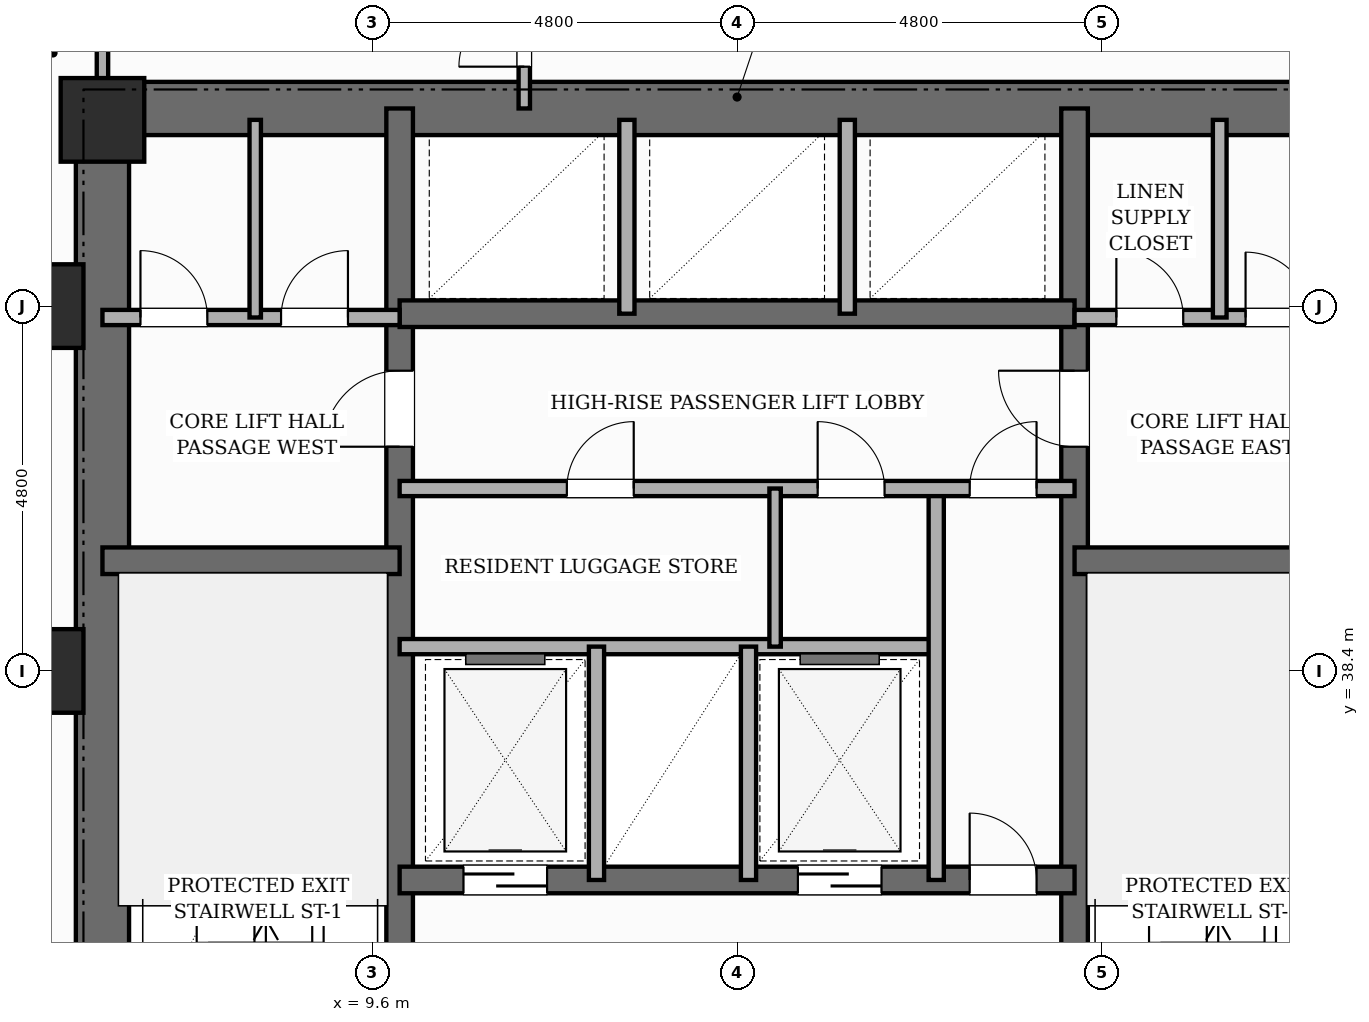
"""IFC4 building model, lengths in metres.
Left out: names, types, materials, properties, quantities, classifications, styles, units other than length and angle.
Written with IfcOpenShell. Run it as: python <this file> out.ifc"""

import sys

from ifc_helpers import new_model, si_unit, direction, frame, frame_2d, origin, origin_2d, place, context, subcontext, project, spatial, rectangle, extrude, element, fill, save


model = new_model("IFC4")
c1 = context("Model", 3, precision=1e-05, world=origin(), true_north=direction((0.0, 1.0)))
c2 = subcontext(c1, "Body", "Model", "MODEL_VIEW")
j1 = project(units=[si_unit("LENGTHUNIT", "METRE"), si_unit("PLANEANGLEUNIT", "RADIAN")], contexts=[c1])
p1 = place(None, origin())
s1 = spatial("IfcSite", under=j1, at=p1, CompositionType="ELEMENT")
p2 = place(p1, origin())
s2 = spatial("IfcBuilding", under=s1, at=p2, CompositionType="ELEMENT")
p3 = place(p2, frame((0.0, 0.0, 28.6)))
s3 = spatial("IfcBuildingStorey", under=s2, at=p3, CompositionType="ELEMENT", Elevation=28.6)
p4 = place(p3, frame((6.05, 30.55, 0.0), z_axis=(0.0, 0.0, 1.0), x_axis=(0.0, 1.0, 0.0)))
e1 = element("IfcWall", 1, at=p4, inside=s3, PredefinedType="SHEAR", context=c2, shape_type="SweptSolid", body=[
    extrude(rectangle(XDim=15.6, YDim=0.7, at=frame_2d((7.8, 0.0))), origin(), (0.0, 0.0, 1.0), 3.6),
])
p5 = place(p3, frame((6.05, 45.8, 0.0), z_axis=(0.0, 0.0, 1.0), x_axis=(1.0, 0.0, 0.0)))
e2 = element("IfcWall", 2, at=p5, inside=s3, PredefinedType="SHEAR", context=c2, shape_type="SweptSolid", body=[
    extrude(rectangle(XDim=16.7, YDim=0.7, at=frame_2d((8.35, 0.0))), origin(), (0.0, 0.0, 1.0), 3.6),
])
p6 = place(p3, frame((9.96, 30.9, 0.0), z_axis=(0.0, 0.0, 1.0), x_axis=(0.0, 1.0, 0.0)))
e3 = element("IfcWall", 3, at=p6, inside=s3, PredefinedType="SHEAR", context=c2, shape_type="SweptSolid", body=[
    extrude(rectangle(XDim=14.9, YDim=0.35, at=frame_2d((7.45, 0.0))), origin(), (0.0, 0.0, 1.0), 3.6),
])
p7 = place(p6, frame((0.65, 0.0, 0.0)))
e4 = element("IfcOpeningElement", 4, at=p7, cuts=e3, PredefinedType="OPENING", context=c2, shape_type="SweptSolid", body=[
    extrude(rectangle(XDim=0.95, YDim=2.1, at=frame_2d((0.475, 1.05))), frame((0.0, 0.185, 0.0), z_axis=(0.0, -1.0, 0.0), x_axis=(1.0, 0.0, 0.0)), (0.0, 0.0, 1.0), 0.37),
])
p8 = place(p6, frame((10.45, 0.0, 0.0)))
e5 = element("IfcOpeningElement", 5, at=p8, cuts=e3, PredefinedType="OPENING", context=c2, shape_type="SweptSolid", body=[
    extrude(rectangle(XDim=1.0, YDim=2.15, at=frame_2d((0.5, 1.075))), frame((0.0, 0.185, 0.0), z_axis=(0.0, -1.0, 0.0), x_axis=(1.0, 0.0, 0.0)), (0.0, 0.0, 1.0), 0.37),
])
p9 = place(p3, frame((18.84, 30.9, 0.0), z_axis=(0.0, 0.0, 1.0), x_axis=(0.0, 1.0, 0.0)))
e6 = element("IfcWall", 6, at=p9, inside=s3, PredefinedType="SHEAR", context=c2, shape_type="SweptSolid", body=[
    extrude(rectangle(XDim=14.9, YDim=0.35, at=frame_2d((7.45, 0.0))), origin(), (0.0, 0.0, 1.0), 3.6),
])
p10 = place(p9, frame((0.65, 0.0, 0.0)))
e7 = element("IfcOpeningElement", 7, at=p10, cuts=e6, PredefinedType="OPENING", context=c2, shape_type="SweptSolid", body=[
    extrude(rectangle(XDim=0.95, YDim=2.1, at=frame_2d((0.475, 1.05))), frame((0.0, 0.185, 0.0), z_axis=(0.0, -1.0, 0.0), x_axis=(1.0, 0.0, 0.0)), (0.0, 0.0, 1.0), 0.37),
])
p11 = place(p9, frame((10.45, 0.0, 0.0)))
e8 = element("IfcOpeningElement", 8, at=p11, cuts=e6, PredefinedType="OPENING", context=c2, shape_type="SweptSolid", body=[
    extrude(rectangle(XDim=1.0, YDim=2.15, at=frame_2d((0.5, 1.075))), frame((0.0, 0.185, 0.0), z_axis=(0.0, -1.0, 0.0), x_axis=(1.0, 0.0, 0.0)), (0.0, 0.0, 1.0), 0.37),
])
for number, where, z_axis, x_axis in (
    (9, (6.05, 39.85, 0.0), (0.0, 0.0, 1.0), (1.0, 0.0, 0.0)),
    (10, (18.84, 39.85, 0.0), (0.0, 0.0, 1.0), (1.0, 0.0, 0.0)),
):
    element("IfcWall", number, at=place(p3, frame(where, z_axis=z_axis, x_axis=x_axis)), inside=s3, PredefinedType="SHEAR", context=c2, shape_type="SweptSolid", body=[
        extrude(rectangle(XDim=3.91, YDim=0.35, at=frame_2d((1.955, 0.0))), origin(), (0.0, 0.0, 1.0), 3.6),
    ])
p12 = place(p3, frame((9.96, 35.65, 0.0), z_axis=(0.0, 0.0, 1.0), x_axis=(1.0, 0.0, 0.0)))
e11 = element("IfcWall", 11, at=p12, inside=s3, PredefinedType="SHEAR", context=c2, shape_type="SweptSolid", body=[
    extrude(rectangle(XDim=8.88, YDim=0.35, at=frame_2d((4.44, 0.0))), origin(), (0.0, 0.0, 1.0), 3.6),
])
p13 = place(p12, frame((0.84, 0.0, 0.0)))
e12 = element("IfcOpeningElement", 12, at=p13, cuts=e11, PredefinedType="OPENING", context=c2, shape_type="SweptSolid", body=[
    extrude(rectangle(XDim=1.1, YDim=2.15, at=frame_2d((0.55, 1.075))), frame((0.0, 0.185, 0.0), z_axis=(0.0, -1.0, 0.0), x_axis=(1.0, 0.0, 0.0)), (0.0, 0.0, 1.0), 0.37),
])
p14 = place(p12, frame((5.24, 0.0, 0.0)))
e13 = element("IfcOpeningElement", 13, at=p14, cuts=e11, PredefinedType="OPENING", context=c2, shape_type="SweptSolid", body=[
    extrude(rectangle(XDim=1.1, YDim=2.15, at=frame_2d((0.55, 1.075))), frame((0.0, 0.185, 0.0), z_axis=(0.0, -1.0, 0.0), x_axis=(1.0, 0.0, 0.0)), (0.0, 0.0, 1.0), 0.37),
])
p15 = place(p12, frame((7.5, 0.0, 0.0)))
e14 = element("IfcOpeningElement", 14, at=p15, cuts=e11, PredefinedType="OPENING", context=c2, shape_type="SweptSolid", body=[
    extrude(rectangle(XDim=0.88, YDim=2.1, at=frame_2d((0.44, 1.05))), frame((0.0, 0.185, 0.0), z_axis=(0.0, -1.0, 0.0), x_axis=(1.0, 0.0, 0.0)), (0.0, 0.0, 1.0), 0.37),
])
p16 = place(p3, frame((9.96, 43.1, 0.0), z_axis=(0.0, 0.0, 1.0), x_axis=(1.0, 0.0, 0.0)))
e15 = element("IfcWall", 15, at=p16, inside=s3, PredefinedType="SHEAR", context=c2, shape_type="SweptSolid", body=[
    extrude(rectangle(XDim=8.88, YDim=0.35, at=frame_2d((4.44, 0.0))), origin(), (0.0, 0.0, 1.0), 3.6),
])
for number, where, z_axis, x_axis in (
    (16, (5.25, 38.4, 0.0), (0.0, 0.0, 1.0), (1.0, 0.0, 0.0)),
    (17, (5.25, 43.2, 0.0), (0.0, 0.0, 1.0), (1.0, 0.0, 0.0)),
    (18, (6.05, 45.65, 0.0), (0.0, 0.0, 1.0), (1.0, 0.0, 0.0)),
):
    element("IfcColumn", number, at=place(p3, frame(where, z_axis=z_axis, x_axis=x_axis)), inside=s3, PredefinedType="COLUMN", context=c2, shape_type="SweptSolid", body=[
        extrude(rectangle(XDim=1.1, YDim=1.1, at=origin_2d()), origin(), (0.0, 0.0, 1.0), 3.6),
    ])
p17 = place(p3, frame((5.03, 46.16, 0.0), z_axis=(0.0, 0.0, 1.0), x_axis=(0.382650053678, 0.92389335771, 0.0)))
e19 = element("IfcWall", 19, at=p17, inside=s3, PredefinedType="STANDARD", context=c2, shape_type="SweptSolid", body=[
    extrude(rectangle(XDim=0.626, YDim=0.32, at=frame_2d((0.313, 0.0))), origin(), (0.0, 0.0, 1.0), 3.35),
])
p18 = place(p3, frame((9.96, 38.72, 0.0), z_axis=(0.0, 0.0, 1.0), x_axis=(1.0, 0.0, 0.0)))
e20 = element("IfcWall", 20, at=p18, inside=s3, PredefinedType="POLYGONAL", context=c2, shape_type="SweptSolid", body=[
    extrude(rectangle(XDim=7.06, YDim=0.2, at=frame_2d((3.53, 0.0))), origin(), (0.0, 0.0, 1.0), 3.35),
])
for number, where, z_axis, x_axis in (
    (21, (12.55, 35.65, 0.0), (0.0, 0.0, 1.0), (0.0, 1.0, 0.0)),
    (22, (14.55, 35.65, 0.0), (0.0, 0.0, 1.0), (0.0, 1.0, 0.0)),
):
    element("IfcWall", number, at=place(p3, frame(where, z_axis=z_axis, x_axis=x_axis)), inside=s3, PredefinedType="POLYGONAL", context=c2, shape_type="SweptSolid", body=[
        extrude(rectangle(XDim=3.07, YDim=0.2, at=frame_2d((1.535, 0.0))), origin(), (0.0, 0.0, 1.0), 3.35),
    ])
p19 = place(p3, frame((17.02, 35.65, 0.0), z_axis=(0.0, 0.0, 1.0), x_axis=(0.0, 1.0, 0.0)))
e23 = element("IfcWall", 23, at=p19, inside=s3, PredefinedType="POLYGONAL", context=c2, shape_type="SweptSolid", body=[
    extrude(rectangle(XDim=5.15, YDim=0.2, at=frame_2d((2.575, 0.0))), origin(), (0.0, 0.0, 1.0), 3.35),
])
p20 = place(p3, frame((9.96, 40.8, 0.0), z_axis=(0.0, 0.0, 1.0), x_axis=(1.0, 0.0, 0.0)))
e24 = element("IfcWall", 24, at=p20, inside=s3, PredefinedType="POLYGONAL", context=c2, shape_type="SweptSolid", body=[
    extrude(rectangle(XDim=8.88, YDim=0.2, at=frame_2d((4.44, 0.0))), origin(), (0.0, 0.0, 1.0), 3.35),
])
p21 = place(p20, frame((7.5, 0.0, 0.0)))
e25 = element("IfcOpeningElement", 25, at=p21, cuts=e24, PredefinedType="OPENING", context=c2, shape_type="SweptSolid", body=[
    extrude(rectangle(XDim=0.88, YDim=2.1, at=frame_2d((0.44, 1.05))), frame((0.0, 0.11, 0.0), z_axis=(0.0, -1.0, 0.0), x_axis=(1.0, 0.0, 0.0)), (0.0, 0.0, 1.0), 0.22),
])
p22 = place(p20, frame((2.2, 0.0, 0.0)))
e26 = element("IfcOpeningElement", 26, at=p22, cuts=e24, PredefinedType="OPENING", context=c2, shape_type="SweptSolid", body=[
    extrude(rectangle(XDim=0.88, YDim=2.1, at=frame_2d((0.44, 1.05))), frame((0.0, 0.11, 0.0), z_axis=(0.0, -1.0, 0.0), x_axis=(1.0, 0.0, 0.0)), (0.0, 0.0, 1.0), 0.22),
])
p23 = place(p20, frame((5.5, 0.0, 0.0)))
e27 = element("IfcOpeningElement", 27, at=p23, cuts=e24, PredefinedType="OPENING", context=c2, shape_type="SweptSolid", body=[
    extrude(rectangle(XDim=0.88, YDim=2.1, at=frame_2d((0.44, 1.05))), frame((0.0, 0.11, 0.0), z_axis=(0.0, -1.0, 0.0), x_axis=(1.0, 0.0, 0.0)), (0.0, 0.0, 1.0), 0.22),
])
p24 = place(p3, frame((18.84, 43.05, 0.0), z_axis=(0.0, 0.0, 1.0), x_axis=(1.0, 0.0, 0.0)))
e28 = element("IfcWall", 28, at=p24, inside=s3, PredefinedType="POLYGONAL", context=c2, shape_type="SweptSolid", body=[
    extrude(rectangle(XDim=3.91, YDim=0.2, at=frame_2d((1.955, 0.0))), origin(), (0.0, 0.0, 1.0), 2.53),
])
p25 = place(p24, frame((0.55, 0.0, 0.0)))
e29 = element("IfcOpeningElement", 29, at=p25, cuts=e28, PredefinedType="OPENING", context=c2, shape_type="SweptSolid", body=[
    extrude(rectangle(XDim=0.88, YDim=2.1, at=frame_2d((0.44, 1.05))), frame((0.0, 0.11, 0.0), z_axis=(0.0, -1.0, 0.0), x_axis=(1.0, 0.0, 0.0)), (0.0, 0.0, 1.0), 0.22),
])
p26 = place(p24, frame((2.25, 0.0, 0.0)))
e30 = element("IfcOpeningElement", 30, at=p26, cuts=e28, PredefinedType="OPENING", context=c2, shape_type="SweptSolid", body=[
    extrude(rectangle(XDim=0.86, YDim=2.1, at=frame_2d((0.43, 1.05))), frame((0.0, 0.11, 0.0), z_axis=(0.0, -1.0, 0.0), x_axis=(1.0, 0.0, 0.0)), (0.0, 0.0, 1.0), 0.22),
])
p27 = place(p3, frame((6.05, 43.05, 0.0), z_axis=(0.0, 0.0, 1.0), x_axis=(1.0, 0.0, 0.0)))
e31 = element("IfcWall", 31, at=p27, inside=s3, PredefinedType="POLYGONAL", context=c2, shape_type="SweptSolid", body=[
    extrude(rectangle(XDim=3.91, YDim=0.2, at=frame_2d((1.955, 0.0))), origin(), (0.0, 0.0, 1.0), 2.53),
])
p28 = place(p27, frame((0.5, 0.0, 0.0)))
e32 = element("IfcOpeningElement", 32, at=p28, cuts=e31, PredefinedType="OPENING", context=c2, shape_type="SweptSolid", body=[
    extrude(rectangle(XDim=0.88, YDim=2.1, at=frame_2d((0.44, 1.05))), frame((0.0, 0.11, 0.0), z_axis=(0.0, -1.0, 0.0), x_axis=(1.0, 0.0, 0.0)), (0.0, 0.0, 1.0), 0.22),
])
p29 = place(p27, frame((2.35, 0.0, 0.0)))
e33 = element("IfcOpeningElement", 33, at=p29, cuts=e31, PredefinedType="OPENING", context=c2, shape_type="SweptSolid", body=[
    extrude(rectangle(XDim=0.88, YDim=2.1, at=frame_2d((0.44, 1.05))), frame((0.0, 0.11, 0.0), z_axis=(0.0, -1.0, 0.0), x_axis=(1.0, 0.0, 0.0)), (0.0, 0.0, 1.0), 0.22),
])
for number, where, z_axis, x_axis in (
    (34, (12.95, 43.1, 0.0), (0.0, 0.0, 1.0), (0.0, 1.0, 0.0)),
    (35, (15.85, 43.1, 0.0), (0.0, 0.0, 1.0), (0.0, 1.0, 0.0)),
):
    element("IfcWall", number, at=place(p3, frame(where, z_axis=z_axis, x_axis=x_axis)), inside=s3, PredefinedType="POLYGONAL", context=c2, shape_type="SweptSolid", body=[
        extrude(rectangle(XDim=2.55, YDim=0.2, at=frame_2d((1.275, 0.0))), origin(), (0.0, 0.0, 1.0), 3.35),
    ])
p30 = place(p3, frame((8.06, 43.05, 0.0), z_axis=(0.0, 0.0, 1.0), x_axis=(0.0, 1.0, 0.0)))
e36 = element("IfcWall", 36, at=p30, inside=s3, PredefinedType="PARTITIONING", context=c2, shape_type="SweptSolid", body=[
    extrude(rectangle(XDim=2.6, YDim=0.15, at=frame_2d((1.3, 0.0))), origin(), (0.0, 0.0, 1.0), 3.35),
])
p31 = place(p3, frame((14.9, 38.72, 0.0), z_axis=(0.0, 0.0, 1.0), x_axis=(0.0, 1.0, 0.0)))
e37 = element("IfcWall", 37, at=p31, inside=s3, PredefinedType="PARTITIONING", context=c2, shape_type="SweptSolid", body=[
    extrude(rectangle(XDim=2.08, YDim=0.15, at=frame_2d((1.04, 0.0))), origin(), (0.0, 0.0, 1.0), 3.35),
])
p32 = place(p3, frame((20.75, 43.05, 0.0), z_axis=(0.0, 0.0, 1.0), x_axis=(0.0, 1.0, 0.0)))
e38 = element("IfcWall", 38, at=p32, inside=s3, PredefinedType="PLUMBINGWALL", context=c2, shape_type="SweptSolid", body=[
    extrude(rectangle(XDim=2.6, YDim=0.18, at=frame_2d((1.3, 0.0))), origin(), (0.0, 0.0, 1.0), 3.35),
])
p33 = place(p3, frame((6.05, 45.8, 0.0), z_axis=(0.0, 0.0, 1.0), x_axis=(0.0, 1.0, 0.0)))
e39 = element("IfcWall", 39, at=p33, inside=s3, PredefinedType="PARTITIONING", context=c2, shape_type="SweptSolid", body=[
    extrude(rectangle(XDim=1.46, YDim=0.15, at=frame_2d((0.73, 0.0))), origin(), (0.0, 0.0, 1.0), 3.35),
])
p34 = place(p3, frame((11.6, 45.8, 0.0), z_axis=(0.0, 0.0, 1.0), x_axis=(0.0, 1.0, 0.0)))
e40 = element("IfcWall", 40, at=p34, inside=s3, PredefinedType="PARTITIONING", context=c2, shape_type="SweptSolid", body=[
    extrude(rectangle(XDim=1.88, YDim=0.15, at=frame_2d((0.94, 0.0))), origin(), (0.0, 0.0, 1.0), 3.35),
])
p35 = place(p34, frame((0.55, 0.0, 0.0)))
e41 = element("IfcOpeningElement", 41, at=p35, cuts=e40, PredefinedType="OPENING", context=c2, shape_type="SweptSolid", body=[
    extrude(rectangle(XDim=0.86, YDim=2.1, at=frame_2d((0.43, 1.05))), frame((0.0, 0.085, 0.0), z_axis=(0.0, -1.0, 0.0), x_axis=(1.0, 0.0, 0.0)), (0.0, 0.0, 1.0), 0.17),
])
p36 = place(p13, origin())
e42 = element("IfcDoor", 42, at=p36, inside=s3, OperationType="SLIDING_TO_LEFT", PredefinedType="DOOR", context=c2, shape_type="SweptSolid", body=[
    extrude(rectangle(XDim=1.1, YDim=2.15, at=frame_2d((0.55, 1.075))), frame((0.0, 0.025, 0.0), z_axis=(0.0, -1.0, 0.0), x_axis=(1.0, 0.0, 0.0)), (0.0, 0.0, 1.0), 0.05),
])
fill(e12, e42)
p37 = place(p14, origin())
e43 = element("IfcDoor", 43, at=p37, inside=s3, OperationType="SLIDING_TO_RIGHT", PredefinedType="DOOR", context=c2, shape_type="SweptSolid", body=[
    extrude(rectangle(XDim=1.1, YDim=2.15, at=frame_2d((0.55, 1.075))), frame((0.0, 0.025, 0.0), z_axis=(0.0, -1.0, 0.0), x_axis=(1.0, 0.0, 0.0)), (0.0, 0.0, 1.0), 0.05),
])
fill(e13, e43)
p38 = place(p15, origin())
e44 = element("IfcDoor", 44, at=p38, inside=s3, OperationType="SINGLE_SWING_LEFT", PredefinedType="DOOR", context=c2, shape_type="SweptSolid", body=[
    extrude(rectangle(XDim=0.88, YDim=2.1, at=frame_2d((0.44, 1.05))), frame((0.0, 0.025, 0.0), z_axis=(0.0, -1.0, 0.0), x_axis=(1.0, 0.0, 0.0)), (0.0, 0.0, 1.0), 0.05),
])
fill(e14, e44)
p39 = place(p21, origin())
e45 = element("IfcDoor", 45, at=p39, inside=s3, OperationType="SINGLE_SWING_RIGHT", PredefinedType="DOOR", context=c2, shape_type="SweptSolid", body=[
    extrude(rectangle(XDim=0.88, YDim=2.1, at=frame_2d((0.44, 1.05))), frame((0.0, 0.025, 0.0), z_axis=(0.0, -1.0, 0.0), x_axis=(1.0, 0.0, 0.0)), (0.0, 0.0, 1.0), 0.05),
])
fill(e25, e45)
p40 = place(p8, origin())
e46 = element("IfcDoor", 46, at=p40, inside=s3, OperationType="SINGLE_SWING_LEFT", PredefinedType="DOOR", context=c2, shape_type="SweptSolid", body=[
    extrude(rectangle(XDim=1.0, YDim=2.15, at=frame_2d((0.5, 1.075))), frame((0.0, 0.025, 0.0), z_axis=(0.0, -1.0, 0.0), x_axis=(1.0, 0.0, 0.0)), (0.0, 0.0, 1.0), 0.05),
])
fill(e5, e46)
p41 = place(p11, origin())
e47 = element("IfcDoor", 47, at=p41, inside=s3, OperationType="SINGLE_SWING_RIGHT", PredefinedType="DOOR", context=c2, shape_type="SweptSolid", body=[
    extrude(rectangle(XDim=1.0, YDim=2.15, at=frame_2d((0.5, 1.075))), frame((0.0, 0.025, 0.0), z_axis=(0.0, -1.0, 0.0), x_axis=(1.0, 0.0, 0.0)), (0.0, 0.0, 1.0), 0.05),
])
fill(e8, e47)
p42 = place(p28, origin())
e48 = element("IfcDoor", 48, at=p42, inside=s3, OperationType="SINGLE_SWING_LEFT", PredefinedType="DOOR", context=c2, shape_type="SweptSolid", body=[
    extrude(rectangle(XDim=0.88, YDim=2.1, at=frame_2d((0.44, 1.05))), frame((0.0, 0.025, 0.0), z_axis=(0.0, -1.0, 0.0), x_axis=(1.0, 0.0, 0.0)), (0.0, 0.0, 1.0), 0.05),
])
fill(e32, e48)
p43 = place(p29, origin())
e49 = element("IfcDoor", 49, at=p43, inside=s3, OperationType="SINGLE_SWING_RIGHT", PredefinedType="DOOR", context=c2, shape_type="SweptSolid", body=[
    extrude(rectangle(XDim=0.88, YDim=2.1, at=frame_2d((0.44, 1.05))), frame((0.0, 0.025, 0.0), z_axis=(0.0, -1.0, 0.0), x_axis=(1.0, 0.0, 0.0)), (0.0, 0.0, 1.0), 0.05),
])
fill(e33, e49)
p44 = place(p22, origin())
e50 = element("IfcDoor", 50, at=p44, inside=s3, OperationType="SINGLE_SWING_RIGHT", PredefinedType="DOOR", context=c2, shape_type="SweptSolid", body=[
    extrude(rectangle(XDim=0.88, YDim=2.1, at=frame_2d((0.44, 1.05))), frame((0.0, 0.025, 0.0), z_axis=(0.0, -1.0, 0.0), x_axis=(1.0, 0.0, 0.0)), (0.0, 0.0, 1.0), 0.05),
])
fill(e26, e50)
p45 = place(p23, origin())
e51 = element("IfcDoor", 51, at=p45, inside=s3, OperationType="SINGLE_SWING_LEFT", PredefinedType="DOOR", context=c2, shape_type="SweptSolid", body=[
    extrude(rectangle(XDim=0.88, YDim=2.1, at=frame_2d((0.44, 1.05))), frame((0.0, 0.025, 0.0), z_axis=(0.0, -1.0, 0.0), x_axis=(1.0, 0.0, 0.0)), (0.0, 0.0, 1.0), 0.05),
])
fill(e27, e51)
p46 = place(p25, origin())
e52 = element("IfcDoor", 52, at=p46, inside=s3, OperationType="SINGLE_SWING_LEFT", PredefinedType="DOOR", context=c2, shape_type="SweptSolid", body=[
    extrude(rectangle(XDim=0.88, YDim=2.1, at=frame_2d((0.44, 1.05))), frame((0.0, 0.025, 0.0), z_axis=(0.0, -1.0, 0.0), x_axis=(1.0, 0.0, 0.0)), (0.0, 0.0, 1.0), 0.05),
])
fill(e29, e52)
p47 = place(p26, origin())
e53 = element("IfcDoor", 53, at=p47, inside=s3, OperationType="SINGLE_SWING_LEFT", PredefinedType="DOOR", context=c2, shape_type="SweptSolid", body=[
    extrude(rectangle(XDim=0.86, YDim=2.1, at=frame_2d((0.43, 1.05))), frame((0.0, 0.025, 0.0), z_axis=(0.0, -1.0, 0.0), x_axis=(1.0, 0.0, 0.0)), (0.0, 0.0, 1.0), 0.05),
])
fill(e30, e53)
p48 = place(p35, origin())
e54 = element("IfcDoor", 54, at=p48, inside=s3, OperationType="SINGLE_SWING_LEFT", PredefinedType="DOOR", context=c2, shape_type="SweptSolid", body=[
    extrude(rectangle(XDim=0.86, YDim=2.1, at=frame_2d((0.43, 1.05))), frame((0.0, 0.025, 0.0), z_axis=(0.0, -1.0, 0.0), x_axis=(1.0, 0.0, 0.0)), (0.0, 0.0, 1.0), 0.05),
])
fill(e41, e54)
save(model, sys.argv[1])
